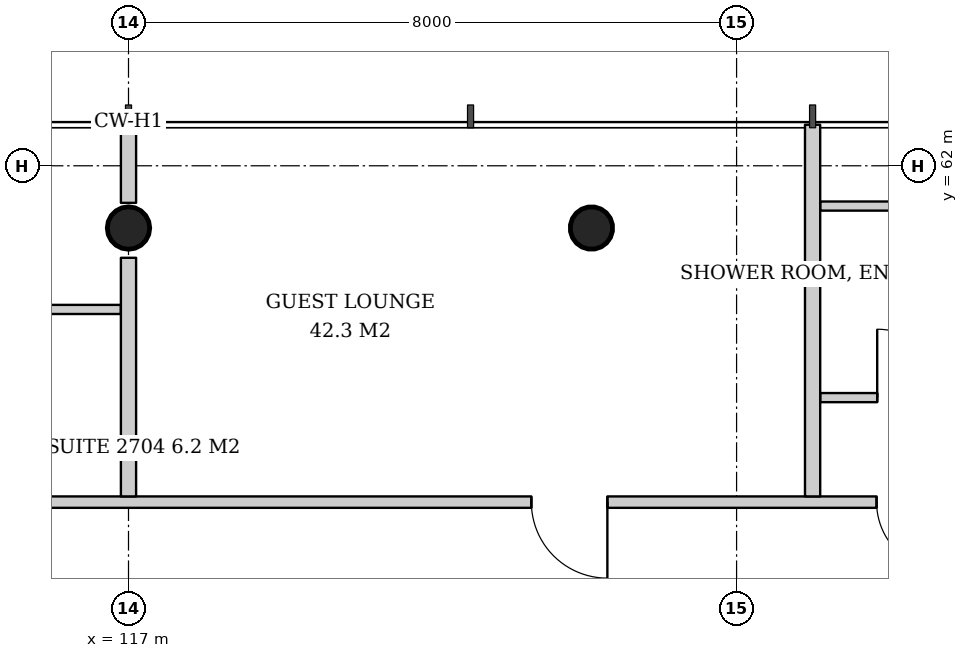
"""IFC4 building model, lengths in metres.
Left out: names, types, materials, properties, quantities, classifications, styles, units other than length and angle.
Written with IfcOpenShell. Run it as: python <this file> out.ifc"""

import sys

from ifc_helpers import new_model, si_unit, direction, frame, frame_2d, origin, origin_2d, place, context, subcontext, project, spatial, rectangle, hollow_circle, extrude, element, fill, save


model = new_model("IFC4")
c1 = context("Model", 3, precision=1e-05, world=origin(), true_north=direction((0.0, 1.0)))
c2 = subcontext(c1, "Body", "Model", "MODEL_VIEW")
j1 = project(units=[si_unit("LENGTHUNIT", "METRE"), si_unit("PLANEANGLEUNIT", "RADIAN")], contexts=[c1])
p1 = place(None, origin())
s1 = spatial("IfcSite", under=j1, at=p1, CompositionType="ELEMENT")
p2 = place(p1, origin())
s2 = spatial("IfcBuilding", under=s1, at=p2, CompositionType="ELEMENT")
p3 = place(p2, frame((0.0, 0.0, 108.4)))
s3 = spatial("IfcBuildingStorey", under=s2, at=p3, CompositionType="ELEMENT", Elevation=108.4)
p4 = place(p3, frame((123.116, 61.233, 0.0), z_axis=(-0.021561848751, -0.043059525333, 0.998839808957), x_axis=(0.894160516368, -0.44774654769, 0.0)))
e1 = element("IfcColumn", 1, at=p4, inside=s3, PredefinedType="COLUMN", context=c2, shape_type="SweptSolid", body=[
    extrude(hollow_circle(Radius=0.28, WallThickness=0.02, at=origin_2d()), origin(), (0.0, 0.0, 1.0), 3.804),
])
p5 = place(p3, frame((117.0, 61.233, 0.0), z_axis=(0.0, -0.043069538298, 0.999072076915), x_axis=(1.0, 0.0, 0.0)))
e2 = element("IfcColumn", 2, at=p5, inside=s3, PredefinedType="COLUMN", context=c2, shape_type="SweptSolid", body=[
    extrude(hollow_circle(Radius=0.28, WallThickness=0.02, at=origin_2d()), origin(), (0.0, 0.0, 1.0), 3.803),
])
p6 = place(p3, frame((126.1, 58.95, 0.0), z_axis=(0.0, 0.0, 1.0), x_axis=(1.0, 0.0, 0.0)))
e3 = element("IfcWall", 3, at=p6, inside=s3, PredefinedType="PARTITIONING", context=c2, shape_type="SweptSolid", body=[
    extrude(rectangle(XDim=2.58, YDim=0.12, at=frame_2d((1.29, 0.0))), origin(), (0.0, 0.0, 1.0), 2.9),
])
p7 = place(p6, frame((0.75, 0.0, 0.0)))
e4 = element("IfcOpeningElement", 4, at=p7, cuts=e3, PredefinedType="OPENING", context=c2, shape_type="SweptSolid", body=[
    extrude(rectangle(XDim=0.9, YDim=2.1, at=frame_2d((0.45, 1.05))), frame((0.0, 0.07, 0.0), z_axis=(0.0, -1.0, 0.0), x_axis=(1.0, 0.0, 0.0)), (0.0, 0.0, 1.0), 0.14),
])
p8 = place(p3, frame((126.1, 61.47, 0.0), z_axis=(0.0, 0.0, 1.0), x_axis=(1.0, 0.0, 0.0)))
e5 = element("IfcWall", 5, at=p8, inside=s3, PredefinedType="PARTITIONING", context=c2, shape_type="SweptSolid", body=[
    extrude(rectangle(XDim=2.689, YDim=0.12, at=frame_2d((1.345, 0.0))), origin(), (0.0, 0.0, 1.0), 3.6),
])
p9 = place(p3, frame((116.9, 60.11, 0.0), z_axis=(0.0, 0.0, 1.0), x_axis=(-1.0, 0.0, 0.0)))
e6 = element("IfcWall", 6, at=p9, inside=s3, PredefinedType="PARTITIONING", context=c2, shape_type="SweptSolid", body=[
    extrude(rectangle(XDim=2.42, YDim=0.12, at=frame_2d((1.21, 0.0))), origin(), (0.0, 0.0, 1.0), 3.6),
])
p10 = place(p3, frame((127.862, 57.575, 0.0), z_axis=(0.0, 0.0, 1.0), x_axis=(-1.0, 0.0, 0.0)))
e7 = element("IfcWall", 7, at=p10, inside=s3, PredefinedType="PARTITIONING", context=c2, shape_type="SweptSolid", body=[
    extrude(rectangle(XDim=21.724, YDim=0.15, at=frame_2d((10.862, 0.0))), origin(), (0.0, 0.0, 1.0), 2.9),
])
p11 = place(p10, frame((0.12, 0.0, 0.0)))
e8 = element("IfcOpeningElement", 8, at=p11, cuts=e7, PredefinedType="OPENING", context=c2, shape_type="SweptSolid", body=[
    extrude(rectangle(XDim=0.9, YDim=2.1, at=frame_2d((0.45, 1.05))), frame((0.0, 0.085, 0.0), z_axis=(0.0, -1.0, 0.0), x_axis=(1.0, 0.0, 0.0)), (0.0, 0.0, 1.0), 0.17),
])
p12 = place(p10, frame((4.562, 0.0, 0.0)))
e9 = element("IfcOpeningElement", 9, at=p12, cuts=e7, PredefinedType="OPENING", context=c2, shape_type="SweptSolid", body=[
    extrude(rectangle(XDim=1.0, YDim=2.1, at=frame_2d((0.5, 1.05))), frame((0.0, 0.085, 0.0), z_axis=(0.0, -1.0, 0.0), x_axis=(1.0, 0.0, 0.0)), (0.0, 0.0, 1.0), 0.17),
])
p13 = place(p10, frame((13.612, 0.0, 0.0)))
e10 = element("IfcOpeningElement", 10, at=p13, cuts=e7, PredefinedType="OPENING", context=c2, shape_type="SweptSolid", body=[
    extrude(rectangle(XDim=0.9, YDim=2.1, at=frame_2d((0.45, 1.05))), frame((0.0, 0.085, 0.0), z_axis=(0.0, -1.0, 0.0), x_axis=(1.0, 0.0, 0.0)), (0.0, 0.0, 1.0), 0.17),
])
p14 = place(p3, frame((126.0, 57.65, 0.0), z_axis=(0.0, 0.0, 1.0), x_axis=(0.0, 1.0, 0.0)))
e11 = element("IfcWall", 11, at=p14, inside=s3, PredefinedType="PARTITIONING", context=c2, shape_type="SweptSolid", body=[
    extrude(rectangle(XDim=4.89, YDim=0.2, at=frame_2d((2.445, 0.0))), origin(), (0.0, 0.0, 1.0), 2.9),
])
p15 = place(p3, frame((117.0, 57.65, 0.0), z_axis=(0.0, 0.0, 1.0), x_axis=(0.0, 1.0, 0.0)))
e12 = element("IfcWall", 12, at=p15, inside=s3, PredefinedType="PARTITIONING", context=c2, shape_type="SweptSolid", body=[
    extrude(rectangle(XDim=3.14, YDim=0.2, at=frame_2d((1.57, 0.0))), origin(), (0.0, 0.0, 1.0), 3.6),
])
p16 = place(p3, frame((117.0, 61.512, 0.0), z_axis=(0.0, 0.0, 1.0), x_axis=(0.0, 1.0, 0.0)))
e13 = element("IfcWall", 13, at=p16, inside=s3, PredefinedType="PARTITIONING", context=c2, shape_type="SweptSolid", body=[
    extrude(rectangle(XDim=1.028, YDim=0.2, at=frame_2d((0.514, 0.0))), origin(), (0.0, 0.0, 1.0), 3.6),
])
p17 = place(p7, origin())
e14 = element("IfcDoor", 14, at=p17, inside=s3, OperationType="SINGLE_SWING_LEFT", PredefinedType="DOOR", context=c2, shape_type="SweptSolid", body=[
    extrude(rectangle(XDim=0.9, YDim=2.1, at=frame_2d((0.45, 1.05))), frame((0.0, 0.025, 0.0), z_axis=(0.0, -1.0, 0.0), x_axis=(1.0, 0.0, 0.0)), (0.0, 0.0, 1.0), 0.05),
])
fill(e4, e14)
p18 = place(p11, origin())
e15 = element("IfcDoor", 15, at=p18, inside=s3, OperationType="SINGLE_SWING_LEFT", PredefinedType="DOOR", context=c2, shape_type="SweptSolid", body=[
    extrude(rectangle(XDim=0.9, YDim=2.1, at=frame_2d((0.45, 1.05))), frame((0.0, 0.025, 0.0), z_axis=(0.0, -1.0, 0.0), x_axis=(1.0, 0.0, 0.0)), (0.0, 0.0, 1.0), 0.05),
])
fill(e8, e15)
p19 = place(p12, origin())
e16 = element("IfcDoor", 16, at=p19, inside=s3, OperationType="SINGLE_SWING_LEFT", PredefinedType="DOOR", context=c2, shape_type="SweptSolid", body=[
    extrude(rectangle(XDim=1.0, YDim=2.1, at=frame_2d((0.5, 1.05))), frame((0.0, 0.025, 0.0), z_axis=(0.0, -1.0, 0.0), x_axis=(1.0, 0.0, 0.0)), (0.0, 0.0, 1.0), 0.05),
])
fill(e9, e16)
save(model, sys.argv[1])
